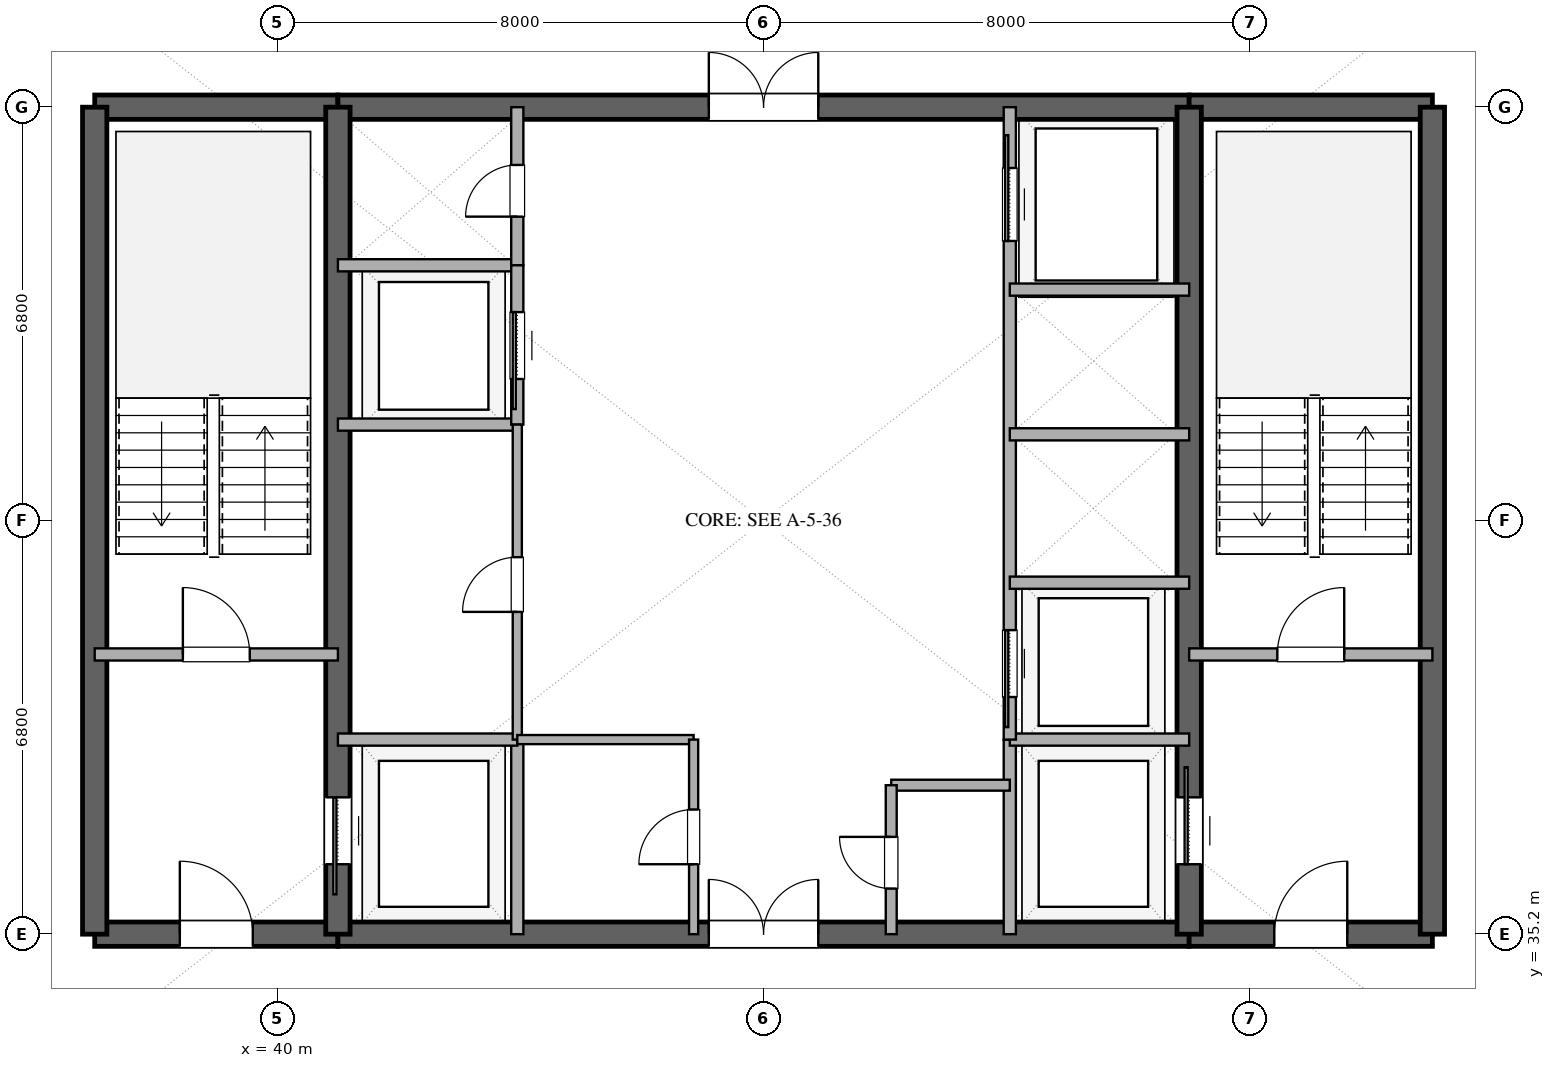
"""IFC4 building model, lengths in metres.
Left out: names, types, materials, properties, quantities, classifications, styles, units other than length and angle.
Written with IfcOpenShell. Run it as: python <this file> out.ifc"""

import sys

from ifc_helpers import new_model, si_unit, direction, frame, frame_2d, origin, place, context, subcontext, project, spatial, rectangle, extrude, element, fill, save


model = new_model("IFC4")
c1 = context("Model", 3, precision=1e-05, world=origin(), true_north=direction((0.0, 1.0)))
c2 = subcontext(c1, "Body", "Model", "MODEL_VIEW")
j1 = project(units=[si_unit("LENGTHUNIT", "METRE"), si_unit("PLANEANGLEUNIT", "RADIAN")], contexts=[c1])
p1 = place(None, origin())
s1 = spatial("IfcSite", under=j1, at=p1, CompositionType="ELEMENT")
p2 = place(p1, origin())
s2 = spatial("IfcBuilding", under=s1, at=p2, CompositionType="ELEMENT")
p3 = place(p2, frame((0.0, 0.0, 246.0)))
s3 = spatial("IfcBuildingStorey", under=s2, at=p3, CompositionType="ELEMENT", Elevation=246.0)
p4 = place(p3, frame((37.0, 35.2, 0.0), z_axis=(0.0, 0.0, 1.0), x_axis=(1.0, 0.0, 0.0)))
e1 = element("IfcWall", 1, at=p4, inside=s3, PredefinedType="SHEAR", context=c2, shape_type="SweptSolid", body=[
    extrude(rectangle(XDim=4.0, YDim=0.4, at=frame_2d((2.0, 0.0))), origin(), (0.0, 0.0, 1.0), 3.36),
])
p5 = place(p4, frame((1.4, 0.0, 0.0)))
e2 = element("IfcOpeningElement", 2, at=p5, cuts=e1, PredefinedType="OPENING", context=c2, shape_type="SweptSolid", body=[
    extrude(rectangle(XDim=1.2, YDim=2.15, at=frame_2d((0.6, 1.075))), frame((0.0, 0.21, 0.0), z_axis=(0.0, -1.0, 0.0), x_axis=(1.0, 0.0, 0.0)), (0.0, 0.0, 1.0), 0.42),
])
p6 = place(p3, frame((41.0, 35.2, 0.0), z_axis=(0.0, 0.0, 1.0), x_axis=(1.0, 0.0, 0.0)))
e3 = element("IfcWall", 3, at=p6, inside=s3, PredefinedType="SHEAR", context=c2, shape_type="SweptSolid", body=[
    extrude(rectangle(XDim=14.0, YDim=0.4, at=frame_2d((7.0, 0.0))), origin(), (0.0, 0.0, 1.0), 3.36),
])
p7 = place(p6, frame((6.1, 0.0, 0.0)))
e4 = element("IfcOpeningElement", 4, at=p7, cuts=e3, PredefinedType="OPENING", context=c2, shape_type="SweptSolid", body=[
    extrude(rectangle(XDim=1.8, YDim=2.25, at=frame_2d((0.9, 1.125))), frame((0.0, 0.21, 0.0), z_axis=(0.0, -1.0, 0.0), x_axis=(1.0, 0.0, 0.0)), (0.0, 0.0, 1.0), 0.42),
])
p8 = place(p3, frame((55.0, 35.2, 0.0), z_axis=(0.0, 0.0, 1.0), x_axis=(1.0, 0.0, 0.0)))
e5 = element("IfcWall", 5, at=p8, inside=s3, PredefinedType="SHEAR", context=c2, shape_type="SweptSolid", body=[
    extrude(rectangle(XDim=4.0, YDim=0.4, at=frame_2d((2.0, 0.0))), origin(), (0.0, 0.0, 1.0), 3.36),
])
p9 = place(p8, frame((1.4, 0.0, 0.0)))
e6 = element("IfcOpeningElement", 6, at=p9, cuts=e5, PredefinedType="OPENING", context=c2, shape_type="SweptSolid", body=[
    extrude(rectangle(XDim=1.2, YDim=2.15, at=frame_2d((0.6, 1.075))), frame((0.0, 0.21, 0.0), z_axis=(0.0, -1.0, 0.0), x_axis=(1.0, 0.0, 0.0)), (0.0, 0.0, 1.0), 0.42),
])
p10 = place(p3, frame((37.0, 48.8, 0.0), z_axis=(0.0, 0.0, 1.0), x_axis=(1.0, 0.0, 0.0)))
e7 = element("IfcWall", 7, at=p10, inside=s3, PredefinedType="SHEAR", context=c2, shape_type="SweptSolid", body=[
    extrude(rectangle(XDim=4.0, YDim=0.4, at=frame_2d((2.0, 0.0))), origin(), (0.0, 0.0, 1.0), 3.36),
])
p11 = place(p3, frame((41.0, 48.8, 0.0), z_axis=(0.0, 0.0, 1.0), x_axis=(1.0, 0.0, 0.0)))
e8 = element("IfcWall", 8, at=p11, inside=s3, PredefinedType="SHEAR", context=c2, shape_type="SweptSolid", body=[
    extrude(rectangle(XDim=14.0, YDim=0.4, at=frame_2d((7.0, 0.0))), origin(), (0.0, 0.0, 1.0), 3.36),
])
p12 = place(p11, frame((6.1, 0.0, 0.0)))
e9 = element("IfcOpeningElement", 9, at=p12, cuts=e8, PredefinedType="OPENING", context=c2, shape_type="SweptSolid", body=[
    extrude(rectangle(XDim=1.8, YDim=2.25, at=frame_2d((0.9, 1.125))), frame((0.0, 0.21, 0.0), z_axis=(0.0, -1.0, 0.0), x_axis=(1.0, 0.0, 0.0)), (0.0, 0.0, 1.0), 0.42),
])
p13 = place(p3, frame((55.0, 48.8, 0.0), z_axis=(0.0, 0.0, 1.0), x_axis=(1.0, 0.0, 0.0)))
e10 = element("IfcWall", 10, at=p13, inside=s3, PredefinedType="SHEAR", context=c2, shape_type="SweptSolid", body=[
    extrude(rectangle(XDim=4.0, YDim=0.4, at=frame_2d((2.0, 0.0))), origin(), (0.0, 0.0, 1.0), 3.36),
])
for number, where, z_axis, x_axis in (
    (11, (37.0, 35.2, 0.0), (0.0, 0.0, 1.0), (0.0, 1.0, 0.0)),
    (12, (59.0, 35.2, 0.0), (0.0, 0.0, 1.0), (0.0, 1.0, 0.0)),
):
    element("IfcWall", number, at=place(p3, frame(where, z_axis=z_axis, x_axis=x_axis)), inside=s3, PredefinedType="SHEAR", context=c2, shape_type="SweptSolid", body=[
        extrude(rectangle(XDim=13.6, YDim=0.4, at=frame_2d((6.8, 0.0))), origin(), (0.0, 0.0, 1.0), 3.36),
    ])
p14 = place(p3, frame((41.0, 35.2, 0.0), z_axis=(0.0, 0.0, 1.0), x_axis=(0.0, 1.0, 0.0)))
e13 = element("IfcWall", 13, at=p14, inside=s3, PredefinedType="SHEAR", context=c2, shape_type="SweptSolid", body=[
    extrude(rectangle(XDim=13.6, YDim=0.4, at=frame_2d((6.8, 0.0))), origin(), (0.0, 0.0, 1.0), 3.36),
])
p15 = place(p14, frame((1.15, 0.0, 0.0)))
e14 = element("IfcOpeningElement", 14, at=p15, cuts=e13, PredefinedType="OPENING", context=c2, shape_type="SweptSolid", body=[
    extrude(rectangle(XDim=1.1, YDim=2.2, at=frame_2d((0.55, 1.1))), frame((0.0, 0.21, 0.0), z_axis=(0.0, -1.0, 0.0), x_axis=(1.0, 0.0, 0.0)), (0.0, 0.0, 1.0), 0.42),
])
p16 = place(p3, frame((55.0, 35.2, 0.0), z_axis=(0.0, 0.0, 1.0), x_axis=(0.0, 1.0, 0.0)))
e15 = element("IfcWall", 15, at=p16, inside=s3, PredefinedType="SHEAR", context=c2, shape_type="SweptSolid", body=[
    extrude(rectangle(XDim=13.6, YDim=0.4, at=frame_2d((6.8, 0.0))), origin(), (0.0, 0.0, 1.0), 3.36),
])
p17 = place(p16, frame((1.15, 0.0, 0.0)))
e16 = element("IfcOpeningElement", 16, at=p17, cuts=e15, PredefinedType="OPENING", context=c2, shape_type="SweptSolid", body=[
    extrude(rectangle(XDim=1.1, YDim=2.2, at=frame_2d((0.55, 1.1))), frame((0.0, 0.21, 0.0), z_axis=(0.0, -1.0, 0.0), x_axis=(1.0, 0.0, 0.0)), (0.0, 0.0, 1.0), 0.42),
])
p18 = place(p3, frame((37.0, 39.8, 0.0), z_axis=(0.0, 0.0, 1.0), x_axis=(1.0, 0.0, 0.0)))
e17 = element("IfcWall", 17, at=p18, inside=s3, PredefinedType="SOLIDWALL", context=c2, shape_type="SweptSolid", body=[
    extrude(rectangle(XDim=4.0, YDim=0.2, at=frame_2d((2.0, 0.0))), origin(), (0.0, 0.0, 1.0), 2.72),
])
p19 = place(p18, frame((1.45, 0.0, 0.0)))
e18 = element("IfcOpeningElement", 18, at=p19, cuts=e17, PredefinedType="OPENING", context=c2, shape_type="SweptSolid", body=[
    extrude(rectangle(XDim=1.1, YDim=2.15, at=frame_2d((0.55, 1.075))), frame((0.0, 0.11, 0.0), z_axis=(0.0, -1.0, 0.0), x_axis=(1.0, 0.0, 0.0)), (0.0, 0.0, 1.0), 0.22),
])
p20 = place(p3, frame((55.0, 39.8, 0.0), z_axis=(0.0, 0.0, 1.0), x_axis=(1.0, 0.0, 0.0)))
e19 = element("IfcWall", 19, at=p20, inside=s3, PredefinedType="SOLIDWALL", context=c2, shape_type="SweptSolid", body=[
    extrude(rectangle(XDim=4.0, YDim=0.2, at=frame_2d((2.0, 0.0))), origin(), (0.0, 0.0, 1.0), 2.72),
])
p21 = place(p20, frame((1.45, 0.0, 0.0)))
e20 = element("IfcOpeningElement", 20, at=p21, cuts=e19, PredefinedType="OPENING", context=c2, shape_type="SweptSolid", body=[
    extrude(rectangle(XDim=1.1, YDim=2.15, at=frame_2d((0.55, 1.075))), frame((0.0, 0.11, 0.0), z_axis=(0.0, -1.0, 0.0), x_axis=(1.0, 0.0, 0.0)), (0.0, 0.0, 1.0), 0.22),
])
p22 = place(p3, frame((43.95, 35.2, 0.0), z_axis=(0.0, 0.0, 1.0), x_axis=(0.0, 1.0, 0.0)))
e21 = element("IfcWall", 21, at=p22, inside=s3, PredefinedType="SOLIDWALL", context=c2, shape_type="SweptSolid", body=[
    extrude(rectangle(XDim=3.2, YDim=0.2, at=frame_2d((1.6, 0.0))), origin(), (0.0, 0.0, 1.0), 2.72),
])
p23 = place(p3, frame((41.0, 38.4, 0.0), z_axis=(0.0, 0.0, 1.0), x_axis=(1.0, 0.0, 0.0)))
e22 = element("IfcWall", 22, at=p23, inside=s3, PredefinedType="SOLIDWALL", context=c2, shape_type="SweptSolid", body=[
    extrude(rectangle(XDim=2.95, YDim=0.2, at=frame_2d((1.475, 0.0))), origin(), (0.0, 0.0, 1.0), 2.72),
])
p24 = place(p3, frame((52.05, 35.2, 0.0), z_axis=(0.0, 0.0, 1.0), x_axis=(0.0, 1.0, 0.0)))
e23 = element("IfcWall", 23, at=p24, inside=s3, PredefinedType="SOLIDWALL", context=c2, shape_type="SweptSolid", body=[
    extrude(rectangle(XDim=3.2, YDim=0.2, at=frame_2d((1.6, 0.0))), origin(), (0.0, 0.0, 1.0), 2.72),
])
for number, where, z_axis, x_axis in (
    (24, (52.05, 38.4, 0.0), (0.0, 0.0, 1.0), (1.0, 0.0, 0.0)),
    (25, (41.0, 46.2, 0.0), (0.0, 0.0, 1.0), (1.0, 0.0, 0.0)),
):
    element("IfcWall", number, at=place(p3, frame(where, z_axis=z_axis, x_axis=x_axis)), inside=s3, PredefinedType="SOLIDWALL", context=c2, shape_type="SweptSolid", body=[
        extrude(rectangle(XDim=2.95, YDim=0.2, at=frame_2d((1.475, 0.0))), origin(), (0.0, 0.0, 1.0), 2.72),
    ])
p25 = place(p3, frame((43.95, 46.2, 0.0), z_axis=(0.0, 0.0, 1.0), x_axis=(0.0, 1.0, 0.0)))
e26 = element("IfcWall", 26, at=p25, inside=s3, PredefinedType="SOLIDWALL", context=c2, shape_type="SweptSolid", body=[
    extrude(rectangle(XDim=2.6, YDim=0.2, at=frame_2d((1.3, 0.0))), origin(), (0.0, 0.0, 1.0), 2.72),
])
p26 = place(p25, frame((0.8, 0.0, 0.0)))
e27 = element("IfcOpeningElement", 27, at=p26, cuts=e26, PredefinedType="OPENING", context=c2, shape_type="SweptSolid", body=[
    extrude(rectangle(XDim=0.85, YDim=2.15, at=frame_2d((0.425, 1.075))), frame((0.0, 0.11, 0.0), z_axis=(0.0, -1.0, 0.0), x_axis=(1.0, 0.0, 0.0)), (0.0, 0.0, 1.0), 0.22),
])
p27 = place(p3, frame((41.0, 43.58, 0.0), z_axis=(0.0, 0.0, 1.0), x_axis=(1.0, 0.0, 0.0)))
e28 = element("IfcWall", 28, at=p27, inside=s3, PredefinedType="SOLIDWALL", context=c2, shape_type="SweptSolid", body=[
    extrude(rectangle(XDim=2.95, YDim=0.2, at=frame_2d((1.475, 0.0))), origin(), (0.0, 0.0, 1.0), 2.72),
])
p28 = place(p3, frame((43.95, 43.58, 0.0), z_axis=(0.0, 0.0, 1.0), x_axis=(0.0, 1.0, 0.0)))
e29 = element("IfcWall", 29, at=p28, inside=s3, PredefinedType="SOLIDWALL", context=c2, shape_type="SweptSolid", body=[
    extrude(rectangle(XDim=2.62, YDim=0.2, at=frame_2d((1.31, 0.0))), origin(), (0.0, 0.0, 1.0), 2.72),
])
p29 = place(p28, frame((0.75, 0.0, 0.0)))
e30 = element("IfcOpeningElement", 30, at=p29, cuts=e29, PredefinedType="OPENING", context=c2, shape_type="SweptSolid", body=[
    extrude(rectangle(XDim=1.1, YDim=2.2, at=frame_2d((0.55, 1.1))), frame((0.0, 0.11, 0.0), z_axis=(0.0, -1.0, 0.0), x_axis=(1.0, 0.0, 0.0)), (0.0, 0.0, 1.0), 0.22),
])
p30 = place(p3, frame((43.95, 38.4, 0.0), z_axis=(0.0, 0.0, 1.0), x_axis=(0.0, 1.0, 0.0)))
e31 = element("IfcWall", 31, at=p30, inside=s3, PredefinedType="PARTITIONING", context=c2, shape_type="SweptSolid", body=[
    extrude(rectangle(XDim=5.18, YDim=0.15, at=frame_2d((2.59, 0.0))), origin(), (0.0, 0.0, 1.0), 2.72),
])
p31 = place(p30, frame((2.1, 0.0, 0.0)))
e32 = element("IfcOpeningElement", 32, at=p31, cuts=e31, PredefinedType="OPENING", context=c2, shape_type="SweptSolid", body=[
    extrude(rectangle(XDim=0.9, YDim=2.15, at=frame_2d((0.45, 1.075))), frame((0.0, 0.085, 0.0), z_axis=(0.0, -1.0, 0.0), x_axis=(1.0, 0.0, 0.0)), (0.0, 0.0, 1.0), 0.17),
])
p32 = place(p3, frame((52.05, 38.4, 0.0), z_axis=(0.0, 0.0, 1.0), x_axis=(0.0, 1.0, 0.0)))
e33 = element("IfcWall", 33, at=p32, inside=s3, PredefinedType="SOLIDWALL", context=c2, shape_type="SweptSolid", body=[
    extrude(rectangle(XDim=10.4, YDim=0.2, at=frame_2d((5.2, 0.0))), origin(), (0.0, 0.0, 1.0), 2.72),
])
p33 = place(p32, frame((0.7, 0.0, 0.0)))
e34 = element("IfcOpeningElement", 34, at=p33, cuts=e33, PredefinedType="OPENING", context=c2, shape_type="SweptSolid", body=[
    extrude(rectangle(XDim=1.1, YDim=2.2, at=frame_2d((0.55, 1.1))), frame((0.0, 0.11, 0.0), z_axis=(0.0, -1.0, 0.0), x_axis=(1.0, 0.0, 0.0)), (0.0, 0.0, 1.0), 0.22),
])
p34 = place(p32, frame((8.2, 0.0, 0.0)))
e35 = element("IfcOpeningElement", 35, at=p34, cuts=e33, PredefinedType="OPENING", context=c2, shape_type="SweptSolid", body=[
    extrude(rectangle(XDim=1.2, YDim=2.2, at=frame_2d((0.6, 1.1))), frame((0.0, 0.11, 0.0), z_axis=(0.0, -1.0, 0.0), x_axis=(1.0, 0.0, 0.0)), (0.0, 0.0, 1.0), 0.22),
])
for number, where, z_axis, x_axis in (
    (36, (52.05, 40.98, 0.0), (0.0, 0.0, 1.0), (1.0, 0.0, 0.0)),
    (37, (52.05, 43.42, 0.0), (0.0, 0.0, 1.0), (1.0, 0.0, 0.0)),
    (38, (52.05, 45.8, 0.0), (0.0, 0.0, 1.0), (1.0, 0.0, 0.0)),
):
    element("IfcWall", number, at=place(p3, frame(where, z_axis=z_axis, x_axis=x_axis)), inside=s3, PredefinedType="SOLIDWALL", context=c2, shape_type="SweptSolid", body=[
        extrude(rectangle(XDim=2.95, YDim=0.2, at=frame_2d((1.475, 0.0))), origin(), (0.0, 0.0, 1.0), 2.72),
    ])
p35 = place(p3, frame((43.95, 38.4, 0.0), z_axis=(0.0, 0.0, 1.0), x_axis=(1.0, 0.0, 0.0)))
e39 = element("IfcWall", 39, at=p35, inside=s3, PredefinedType="PARTITIONING", context=c2, shape_type="SweptSolid", body=[
    extrude(rectangle(XDim=2.9, YDim=0.15, at=frame_2d((1.45, 0.0))), origin(), (0.0, 0.0, 1.0), 2.72),
])
p36 = place(p3, frame((46.85, 35.2, 0.0), z_axis=(0.0, 0.0, 1.0), x_axis=(0.0, 1.0, 0.0)))
e40 = element("IfcWall", 40, at=p36, inside=s3, PredefinedType="PARTITIONING", context=c2, shape_type="SweptSolid", body=[
    extrude(rectangle(XDim=3.2, YDim=0.15, at=frame_2d((1.6, 0.0))), origin(), (0.0, 0.0, 1.0), 2.72),
])
p37 = place(p36, frame((1.15, 0.0, 0.0)))
e41 = element("IfcOpeningElement", 41, at=p37, cuts=e40, PredefinedType="OPENING", context=c2, shape_type="SweptSolid", body=[
    extrude(rectangle(XDim=0.9, YDim=2.15, at=frame_2d((0.45, 1.075))), frame((0.0, 0.085, 0.0), z_axis=(0.0, -1.0, 0.0), x_axis=(1.0, 0.0, 0.0)), (0.0, 0.0, 1.0), 0.17),
])
p38 = place(p3, frame((50.1, 37.65, 0.0), z_axis=(0.0, 0.0, 1.0), x_axis=(1.0, 0.0, 0.0)))
e42 = element("IfcWall", 42, at=p38, inside=s3, PredefinedType="PLUMBINGWALL", context=c2, shape_type="SweptSolid", body=[
    extrude(rectangle(XDim=1.95, YDim=0.18, at=frame_2d((0.975, 0.0))), origin(), (0.0, 0.0, 1.0), 2.72),
])
p39 = place(p3, frame((50.1, 35.2, 0.0), z_axis=(0.0, 0.0, 1.0), x_axis=(0.0, 1.0, 0.0)))
e43 = element("IfcWall", 43, at=p39, inside=s3, PredefinedType="PLUMBINGWALL", context=c2, shape_type="SweptSolid", body=[
    extrude(rectangle(XDim=2.45, YDim=0.18, at=frame_2d((1.225, 0.0))), origin(), (0.0, 0.0, 1.0), 2.72),
])
p40 = place(p39, frame((0.75, 0.0, 0.0)))
e44 = element("IfcOpeningElement", 44, at=p40, cuts=e43, PredefinedType="OPENING", context=c2, shape_type="SweptSolid", body=[
    extrude(rectangle(XDim=0.85, YDim=2.1, at=frame_2d((0.425, 1.05))), frame((0.0, 0.1, 0.0), z_axis=(0.0, -1.0, 0.0), x_axis=(1.0, 0.0, 0.0)), (0.0, 0.0, 1.0), 0.2),
])
p41 = place(p15, origin())
e45 = element("IfcDoor", 45, at=p41, inside=s3, OperationType="SLIDING_TO_LEFT", PredefinedType="DOOR", context=c2, shape_type="SweptSolid", body=[
    extrude(rectangle(XDim=1.1, YDim=2.2, at=frame_2d((0.55, 1.1))), frame((0.0, 0.025, 0.0), z_axis=(0.0, -1.0, 0.0), x_axis=(1.0, 0.0, 0.0)), (0.0, 0.0, 1.0), 0.05),
])
fill(e14, e45)
p42 = place(p17, origin())
e46 = element("IfcDoor", 46, at=p42, inside=s3, OperationType="SLIDING_TO_RIGHT", PredefinedType="DOOR", context=c2, shape_type="SweptSolid", body=[
    extrude(rectangle(XDim=1.1, YDim=2.2, at=frame_2d((0.55, 1.1))), frame((0.0, 0.025, 0.0), z_axis=(0.0, -1.0, 0.0), x_axis=(1.0, 0.0, 0.0)), (0.0, 0.0, 1.0), 0.05),
])
fill(e16, e46)
p43 = place(p5, origin())
e47 = element("IfcDoor", 47, at=p43, inside=s3, OperationType="SINGLE_SWING_LEFT", PredefinedType="DOOR", context=c2, shape_type="SweptSolid", body=[
    extrude(rectangle(XDim=1.2, YDim=2.15, at=frame_2d((0.6, 1.075))), frame((0.0, 0.025, 0.0), z_axis=(0.0, -1.0, 0.0), x_axis=(1.0, 0.0, 0.0)), (0.0, 0.0, 1.0), 0.05),
])
fill(e2, e47)
p44 = place(p9, origin())
e48 = element("IfcDoor", 48, at=p44, inside=s3, OperationType="SINGLE_SWING_RIGHT", PredefinedType="DOOR", context=c2, shape_type="SweptSolid", body=[
    extrude(rectangle(XDim=1.2, YDim=2.15, at=frame_2d((0.6, 1.075))), frame((0.0, 0.025, 0.0), z_axis=(0.0, -1.0, 0.0), x_axis=(1.0, 0.0, 0.0)), (0.0, 0.0, 1.0), 0.05),
])
fill(e6, e48)
p45 = place(p7, origin())
e49 = element("IfcDoor", 49, at=p45, inside=s3, OperationType="DOUBLE_DOOR_SINGLE_SWING", PredefinedType="DOOR", context=c2, shape_type="SweptSolid", body=[
    extrude(rectangle(XDim=1.8, YDim=2.25, at=frame_2d((0.9, 1.125))), frame((0.0, 0.025, 0.0), z_axis=(0.0, -1.0, 0.0), x_axis=(1.0, 0.0, 0.0)), (0.0, 0.0, 1.0), 0.05),
])
fill(e4, e49)
p46 = place(p12, origin())
e50 = element("IfcDoor", 50, at=p46, inside=s3, OperationType="DOUBLE_DOOR_SINGLE_SWING", PredefinedType="DOOR", context=c2, shape_type="SweptSolid", body=[
    extrude(rectangle(XDim=1.8, YDim=2.25, at=frame_2d((0.9, 1.125))), frame((0.0, 0.025, 0.0), z_axis=(0.0, -1.0, 0.0), x_axis=(1.0, 0.0, 0.0)), (0.0, 0.0, 1.0), 0.05),
])
fill(e9, e50)
p47 = place(p19, origin())
e51 = element("IfcDoor", 51, at=p47, inside=s3, OperationType="SINGLE_SWING_LEFT", PredefinedType="DOOR", context=c2, shape_type="SweptSolid", body=[
    extrude(rectangle(XDim=1.1, YDim=2.15, at=frame_2d((0.55, 1.075))), frame((0.0, 0.025, 0.0), z_axis=(0.0, -1.0, 0.0), x_axis=(1.0, 0.0, 0.0)), (0.0, 0.0, 1.0), 0.05),
])
fill(e18, e51)
p48 = place(p21, origin())
e52 = element("IfcDoor", 52, at=p48, inside=s3, OperationType="SINGLE_SWING_RIGHT", PredefinedType="DOOR", context=c2, shape_type="SweptSolid", body=[
    extrude(rectangle(XDim=1.1, YDim=2.15, at=frame_2d((0.55, 1.075))), frame((0.0, 0.025, 0.0), z_axis=(0.0, -1.0, 0.0), x_axis=(1.0, 0.0, 0.0)), (0.0, 0.0, 1.0), 0.05),
])
fill(e20, e52)
p49 = place(p26, origin())
e53 = element("IfcDoor", 53, at=p49, inside=s3, OperationType="SINGLE_SWING_LEFT", PredefinedType="DOOR", context=c2, shape_type="SweptSolid", body=[
    extrude(rectangle(XDim=0.85, YDim=2.15, at=frame_2d((0.425, 1.075))), frame((0.0, 0.025, 0.0), z_axis=(0.0, -1.0, 0.0), x_axis=(1.0, 0.0, 0.0)), (0.0, 0.0, 1.0), 0.05),
])
fill(e27, e53)
p50 = place(p29, origin())
e54 = element("IfcDoor", 54, at=p50, inside=s3, OperationType="SLIDING_TO_LEFT", PredefinedType="DOOR", context=c2, shape_type="SweptSolid", body=[
    extrude(rectangle(XDim=1.1, YDim=2.2, at=frame_2d((0.55, 1.1))), frame((0.0, 0.025, 0.0), z_axis=(0.0, -1.0, 0.0), x_axis=(1.0, 0.0, 0.0)), (0.0, 0.0, 1.0), 0.05),
])
fill(e30, e54)
p51 = place(p31, origin())
e55 = element("IfcDoor", 55, at=p51, inside=s3, OperationType="SINGLE_SWING_LEFT", PredefinedType="DOOR", context=c2, shape_type="SweptSolid", body=[
    extrude(rectangle(XDim=0.9, YDim=2.15, at=frame_2d((0.45, 1.075))), frame((0.0, 0.025, 0.0), z_axis=(0.0, -1.0, 0.0), x_axis=(1.0, 0.0, 0.0)), (0.0, 0.0, 1.0), 0.05),
])
fill(e32, e55)
p52 = place(p33, origin())
e56 = element("IfcDoor", 56, at=p52, inside=s3, OperationType="SLIDING_TO_LEFT", PredefinedType="DOOR", context=c2, shape_type="SweptSolid", body=[
    extrude(rectangle(XDim=1.1, YDim=2.2, at=frame_2d((0.55, 1.1))), frame((0.0, 0.025, 0.0), z_axis=(0.0, -1.0, 0.0), x_axis=(1.0, 0.0, 0.0)), (0.0, 0.0, 1.0), 0.05),
])
fill(e34, e56)
p53 = place(p34, origin())
e57 = element("IfcDoor", 57, at=p53, inside=s3, OperationType="SLIDING_TO_RIGHT", PredefinedType="DOOR", context=c2, shape_type="SweptSolid", body=[
    extrude(rectangle(XDim=1.2, YDim=2.2, at=frame_2d((0.6, 1.1))), frame((0.0, 0.025, 0.0), z_axis=(0.0, -1.0, 0.0), x_axis=(1.0, 0.0, 0.0)), (0.0, 0.0, 1.0), 0.05),
])
fill(e35, e57)
p54 = place(p37, origin())
e58 = element("IfcDoor", 58, at=p54, inside=s3, OperationType="SINGLE_SWING_LEFT", PredefinedType="DOOR", context=c2, shape_type="SweptSolid", body=[
    extrude(rectangle(XDim=0.9, YDim=2.15, at=frame_2d((0.45, 1.075))), frame((0.0, 0.025, 0.0), z_axis=(0.0, -1.0, 0.0), x_axis=(1.0, 0.0, 0.0)), (0.0, 0.0, 1.0), 0.05),
])
fill(e41, e58)
p55 = place(p40, origin())
e59 = element("IfcDoor", 59, at=p55, inside=s3, OperationType="SINGLE_SWING_RIGHT", PredefinedType="DOOR", context=c2, shape_type="SweptSolid", body=[
    extrude(rectangle(XDim=0.85, YDim=2.1, at=frame_2d((0.425, 1.05))), frame((0.0, 0.025, 0.0), z_axis=(0.0, -1.0, 0.0), x_axis=(1.0, 0.0, 0.0)), (0.0, 0.0, 1.0), 0.05),
])
fill(e44, e59)
save(model, sys.argv[1])
